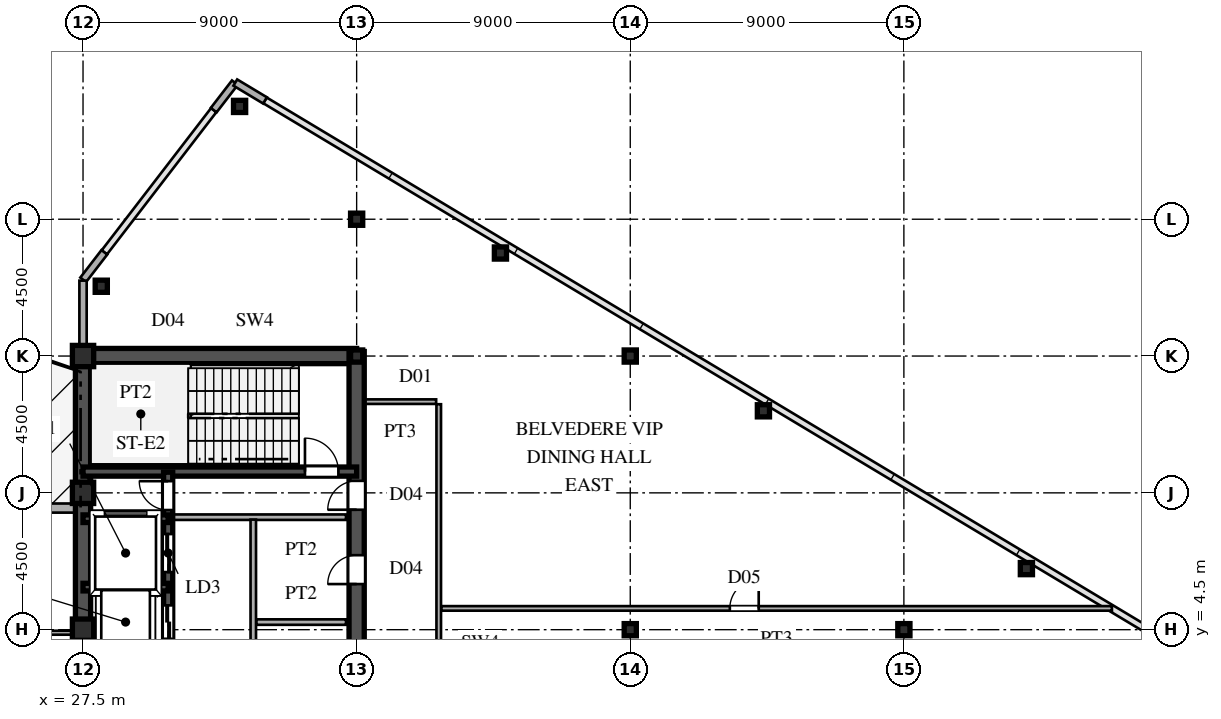
"""IFC4 building model, lengths in metres.
Left out: names, types, materials, properties, quantities, classifications, styles, units other than length and angle.
Written with IfcOpenShell. Run it as: python <this file> out.ifc"""

import sys

from ifc_helpers import new_model, si_unit, direction, frame, frame_2d, origin, origin_2d, place, context, subcontext, project, spatial, rectangle, hollow_rectangle, i_section, extrude, source, transform, mapped, element, fill, save


model = new_model("IFC4")
c1 = context("Model", 3, precision=1e-05, world=origin(), true_north=direction((0.0, 1.0)))
c2 = subcontext(c1, "Body", "Model", "MODEL_VIEW")
j1 = project(units=[si_unit("LENGTHUNIT", "METRE"), si_unit("PLANEANGLEUNIT", "RADIAN")], contexts=[c1])
p1 = place(None, origin())
s1 = spatial("IfcSite", under=j1, at=p1, CompositionType="ELEMENT")
p2 = place(p1, origin())
s2 = spatial("IfcBuilding", under=s1, at=p2, CompositionType="ELEMENT")
p3 = place(p2, frame((0.0, 0.0, 274.2)))
s3 = spatial("IfcBuildingStorey", under=s2, at=p3, CompositionType="ELEMENT", Elevation=274.2)
m1 = source(origin(), c2, "Body", "SweptSolid", [
    extrude(hollow_rectangle(XDim=0.7, YDim=0.7, WallThickness=0.03, at=origin_2d()), origin(), (0.0, 0.0, 1.0), 4.8),
])
for number, where, z_axis, x_axis in (
    (1, (27.5, 4.5, 0.0), (0.0, 0.0, 1.0), (1.0, 0.0, 0.0)),
    (2, (27.5, 9.0, 0.0), (0.0, 0.0, 1.0), (1.0, 0.0, 0.0)),
    (3, (27.5, 13.5, 0.0), (0.0, 0.0, 1.0), (1.0, 0.0, 0.0)),
):
    element("IfcColumn", number, at=place(p3, frame(where, z_axis=z_axis, x_axis=x_axis)), inside=s3, PredefinedType="COLUMN", context=c2, shape_type="MappedRepresentation", body=[
        mapped(m1, transform((0.0, 0.0, 0.0), scale=1.0)),
    ])
m2 = source(origin(), c2, "Body", "SweptSolid", [
    extrude(i_section(OverallWidth=0.4, OverallDepth=0.4, WebThickness=0.013, FlangeThickness=0.021, at=origin_2d()), origin(), (0.0, 0.0, 1.0), 4.8),
])
for number, where, z_axis, x_axis in (
    (4, (36.5, 13.5, 0.0), (0.0, 0.0, 1.0), (1.0, 0.0, 0.0)),
    (5, (36.5, 18.0, 0.0), (0.0, 0.0, 1.0), (1.0, 0.0, 0.0)),
    (6, (45.5, 4.5, 0.0), (0.0, 0.0, 1.0), (1.0, 0.0, 0.0)),
    (7, (45.5, 13.5, 0.0), (0.0, 0.0, 1.0), (1.0, 0.0, 0.0)),
    (8, (54.5, 4.5, 0.0), (0.0, 0.0, 1.0), (1.0, 0.0, 0.0)),
):
    element("IfcColumn", number, at=place(p3, frame(where, z_axis=z_axis, x_axis=x_axis)), inside=s3, PredefinedType="COLUMN", context=c2, shape_type="MappedRepresentation", body=[
        mapped(m2, transform((0.0, 0.0, 0.0), scale=1.0)),
    ])
m3 = source(origin(), c2, "Body", "SweptSolid", [
    extrude(hollow_rectangle(XDim=0.4, YDim=0.4, WallThickness=0.016, at=origin_2d()), origin(), (0.0, 0.0, 1.0), 4.8),
])
for number, where, z_axis, x_axis in (
    (9, (32.65, 21.71, 0.0), (0.0, 0.0, 1.0), (1.0, 0.0, 0.0)),
    (10, (28.1, 15.796, 0.0), (0.0, 0.0, 1.0), (1.0, 0.0, 0.0)),
    (11, (41.23, 16.889, 0.0), (0.0, 0.0, 1.0), (1.0, 0.0, 0.0)),
    (12, (49.88, 11.699, 0.0), (0.0, 0.0, 1.0), (1.0, 0.0, 0.0)),
    (13, (58.53, 6.509, 0.0), (0.0, 0.0, 1.0), (1.0, 0.0, 0.0)),
):
    element("IfcColumn", number, at=place(p3, frame(where, z_axis=z_axis, x_axis=x_axis)), inside=s3, PredefinedType="COLUMN", context=c2, shape_type="MappedRepresentation", body=[
        mapped(m3, transform((0.0, 0.0, 0.0), scale=1.0)),
    ])
for number, where, z_axis, x_axis in (
    (14, (33.486, 21.908, 0.0), (0.0, 0.0, 1.0), (-0.857, 0.515, 0.0)),
    (15, (32.494, 22.492, 0.0), (0.0, 0.0, 1.0), (-0.61, -0.793, 0.0)),
    (16, (28.201, 16.912, 0.0), (0.0, 0.0, 1.0), (-0.61, -0.793, 0.0)),
):
    element("IfcWall", number, at=place(p3, frame(where, z_axis=z_axis, x_axis=x_axis)), inside=s3, PredefinedType="SOLIDWALL", context=c2, shape_type="SweptSolid", body=[
        extrude(rectangle(XDim=1.14, YDim=0.24, at=frame_2d((0.57, 0.0))), origin(), (0.0, 0.0, 1.0), 4.52),
    ])
p4 = place(p3, frame((27.5, 13.755, 0.0), z_axis=(0.0, 0.0, 1.0), x_axis=(0.0, 1.0, 0.0)))
e17 = element("IfcWall", 17, at=p4, inside=s3, PredefinedType="SOLIDWALL", context=c2, shape_type="SweptSolid", body=[
    extrude(rectangle(XDim=0.62, YDim=0.24, at=frame_2d((0.31, 0.0))), origin(), (0.0, 0.0, 1.0), 4.02),
])
p5 = place(p3, frame((27.5, 14.375, 0.0), z_axis=(0.0, 0.0, 1.0), x_axis=(0.0, 1.0, 0.0)))
e18 = element("IfcWall", 18, at=p5, inside=s3, PredefinedType="SOLIDWALL", context=c2, shape_type="SweptSolid", body=[
    extrude(rectangle(XDim=1.605, YDim=0.24, at=frame_2d((0.803, 0.0))), origin(), (0.0, 0.0, 1.0), 4.52),
])
p6 = place(p3, frame((-27.45, 8.5, 0.0), z_axis=(0.0, 0.0, 1.0), x_axis=(1.0, 0.0, 0.0)))
e19 = element("IfcWall", 19, at=p6, inside=s3, PredefinedType="SOLIDWALL", context=c2, shape_type="SweptSolid", body=[
    extrude(rectangle(XDim=54.9, YDim=0.3, at=frame_2d((27.45, 0.0))), origin(), (0.0, 0.0, 1.0), 4.52),
])
p7 = place(p6, frame((12.95, 0.0, 0.0)))
e20 = element("IfcOpeningElement", 20, at=p7, cuts=e19, PredefinedType="OPENING", context=c2, shape_type="SweptSolid", body=[
    extrude(rectangle(XDim=1.9, YDim=2.4, at=frame_2d((0.95, 1.2))), frame((0.0, 0.16, 0.0), z_axis=(0.0, -1.0, 0.0), x_axis=(1.0, 0.0, 0.0)), (0.0, 0.0, 1.0), 0.32),
])
p8 = place(p6, frame((23.95, 0.0, 0.0)))
e21 = element("IfcOpeningElement", 21, at=p8, cuts=e19, PredefinedType="OPENING", context=c2, shape_type="SweptSolid", body=[
    extrude(rectangle(XDim=1.9, YDim=2.4, at=frame_2d((0.95, 1.2))), frame((0.0, 0.16, 0.0), z_axis=(0.0, -1.0, 0.0), x_axis=(1.0, 0.0, 0.0)), (0.0, 0.0, 1.0), 0.32),
])
p9 = place(p6, frame((6.95, 0.0, 0.8)))
e22 = element("IfcOpeningElement", 22, at=p9, cuts=e19, PredefinedType="OPENING", context=c2, shape_type="SweptSolid", body=[
    extrude(rectangle(XDim=2.8, YDim=2.1, at=frame_2d((1.4, 1.05))), frame((0.0, 0.16, 0.0), z_axis=(0.0, -1.0, 0.0), x_axis=(1.0, 0.0, 0.0)), (0.0, 0.0, 1.0), 0.32),
])
p10 = place(p6, frame((17.95, 0.0, 0.8)))
e23 = element("IfcOpeningElement", 23, at=p10, cuts=e19, PredefinedType="OPENING", context=c2, shape_type="SweptSolid", body=[
    extrude(rectangle(XDim=2.8, YDim=2.1, at=frame_2d((1.4, 1.05))), frame((0.0, 0.16, 0.0), z_axis=(0.0, -1.0, 0.0), x_axis=(1.0, 0.0, 0.0)), (0.0, 0.0, 1.0), 0.32),
])
p11 = place(p6, frame((28.95, 0.0, 0.8)))
e24 = element("IfcOpeningElement", 24, at=p11, cuts=e19, PredefinedType="OPENING", context=c2, shape_type="SweptSolid", body=[
    extrude(rectangle(XDim=2.8, YDim=2.1, at=frame_2d((1.4, 1.05))), frame((0.0, 0.16, 0.0), z_axis=(0.0, -1.0, 0.0), x_axis=(1.0, 0.0, 0.0)), (0.0, 0.0, 1.0), 0.32),
])
p12 = place(p3, frame((27.5, 1.3, 0.0), z_axis=(0.0, 0.0, 1.0), x_axis=(0.0, 1.0, 0.0)))
e25 = element("IfcWall", 25, at=p12, inside=s3, PredefinedType="SHEAR", context=c2, shape_type="SweptSolid", body=[
    extrude(rectangle(XDim=12.2, YDim=0.5, at=frame_2d((6.1, 0.0))), origin(), (0.0, 0.0, 1.0), 4.52),
])
p13 = place(p3, frame((27.5, 13.5, 0.0), z_axis=(0.0, 0.0, 1.0), x_axis=(1.0, 0.0, 0.0)))
e26 = element("IfcWall", 26, at=p13, inside=s3, PredefinedType="SHEAR", context=c2, shape_type="SweptSolid", body=[
    extrude(rectangle(XDim=9.0, YDim=0.5, at=frame_2d((4.5, 0.0))), origin(), (0.0, 0.0, 1.0), 4.52),
])
p14 = place(p3, frame((36.5, 8.2, 0.0), z_axis=(0.0, 0.0, 1.0), x_axis=(0.0, 1.0, 0.0)))
e27 = element("IfcWall", 27, at=p14, inside=s3, PredefinedType="SHEAR", context=c2, shape_type="SweptSolid", body=[
    extrude(rectangle(XDim=5.45, YDim=0.5, at=frame_2d((2.725, 0.0))), origin(), (0.0, 0.0, 1.0), 4.52),
])
p15 = place(p14, frame((0.245, 0.0, 0.0)))
e28 = element("IfcOpeningElement", 28, at=p15, cuts=e27, PredefinedType="OPENING", context=c2, shape_type="SweptSolid", body=[
    extrude(rectangle(XDim=0.95, YDim=2.15, at=frame_2d((0.475, 1.075))), frame((0.0, 0.26, 0.0), z_axis=(0.0, -1.0, 0.0), x_axis=(1.0, 0.0, 0.0)), (0.0, 0.0, 1.0), 0.52),
])
p16 = place(p3, frame((36.5, 1.3, 0.0), z_axis=(0.0, 0.0, 1.0), x_axis=(0.0, 1.0, 0.0)))
e29 = element("IfcWall", 29, at=p16, inside=s3, PredefinedType="SHEAR", context=c2, shape_type="SweptSolid", body=[
    extrude(rectangle(XDim=3.45, YDim=0.5, at=frame_2d((1.725, 0.0))), origin(), (0.0, 0.0, 1.0), 4.52),
])
p17 = place(p16, frame((1.25, 0.0, 0.0)))
e30 = element("IfcOpeningElement", 30, at=p17, cuts=e29, PredefinedType="OPENING", context=c2, shape_type="SweptSolid", body=[
    extrude(rectangle(XDim=0.95, YDim=2.15, at=frame_2d((0.475, 1.075))), frame((0.0, 0.26, 0.0), z_axis=(0.0, -1.0, 0.0), x_axis=(1.0, 0.0, 0.0)), (0.0, 0.0, 1.0), 0.52),
])
p18 = place(p3, frame((36.5, 4.75, 0.0), z_axis=(0.0, 0.0, 1.0), x_axis=(0.0, 1.0, 0.0)))
e31 = element("IfcWall", 31, at=p18, inside=s3, PredefinedType="SHEAR", context=c2, shape_type="SweptSolid", body=[
    extrude(rectangle(XDim=3.45, YDim=0.5, at=frame_2d((1.725, 0.0))), origin(), (0.0, 0.0, 1.0), 4.52),
])
p19 = place(p18, frame((1.25, 0.0, 0.0)))
e32 = element("IfcOpeningElement", 32, at=p19, cuts=e31, PredefinedType="OPENING", context=c2, shape_type="SweptSolid", body=[
    extrude(rectangle(XDim=0.95, YDim=2.15, at=frame_2d((0.475, 1.075))), frame((0.0, 0.26, 0.0), z_axis=(0.0, -1.0, 0.0), x_axis=(1.0, 0.0, 0.0)), (0.0, 0.0, 1.0), 0.52),
])
p20 = place(p3, frame((27.5, 9.7, 0.0), z_axis=(0.0, 0.0, 1.0), x_axis=(1.0, 0.0, 0.0)))
e33 = element("IfcWall", 33, at=p20, inside=s3, PredefinedType="SHEAR", context=c2, shape_type="SweptSolid", body=[
    extrude(rectangle(XDim=9.0, YDim=0.3, at=frame_2d((4.5, 0.0))), origin(), (0.0, 0.0, 1.0), 4.52),
])
p21 = place(p20, frame((7.3, 0.0, 0.0)))
e34 = element("IfcOpeningElement", 34, at=p21, cuts=e33, PredefinedType="OPENING", context=c2, shape_type="SweptSolid", body=[
    extrude(rectangle(XDim=1.1, YDim=2.2, at=frame_2d((0.55, 1.1))), frame((0.0, 0.16, 0.0), z_axis=(0.0, -1.0, 0.0), x_axis=(1.0, 0.0, 0.0)), (0.0, 0.0, 1.0), 0.32),
])
for number, where, z_axis, x_axis in (
    (35, (27.5, 5.9, 0.0), (0.0, 0.0, 1.0), (1.0, 0.0, 0.0)),
    (36, (27.5, 8.15, 0.0), (0.0, 0.0, 1.0), (1.0, 0.0, 0.0)),
):
    element("IfcWall", number, at=place(p3, frame(where, z_axis=z_axis, x_axis=x_axis)), inside=s3, PredefinedType="SHEAR", context=c2, shape_type="SweptSolid", body=[
        extrude(rectangle(XDim=2.8, YDim=0.25, at=frame_2d((1.4, 0.0))), origin(), (0.0, 0.0, 1.0), 4.52),
    ])
p22 = place(p3, frame((30.3, 3.6, 0.0), z_axis=(0.0, 0.0, 1.0), x_axis=(0.0, 1.0, 0.0)))
e37 = element("IfcWall", 37, at=p22, inside=s3, PredefinedType="SHEAR", context=c2, shape_type="SweptSolid", body=[
    extrude(rectangle(XDim=2.3, YDim=0.3, at=frame_2d((1.15, 0.0))), origin(), (0.0, 0.0, 1.0), 4.52),
])
p23 = place(p22, frame((0.6, 0.0, 0.0)))
e38 = element("IfcOpeningElement", 38, at=p23, cuts=e37, PredefinedType="OPENING", context=c2, shape_type="SweptSolid", body=[
    extrude(rectangle(XDim=1.1, YDim=2.2, at=frame_2d((0.55, 1.1))), frame((0.0, 0.16, 0.0), z_axis=(0.0, -1.0, 0.0), x_axis=(1.0, 0.0, 0.0)), (0.0, 0.0, 1.0), 0.32),
])
p24 = place(p3, frame((30.3, 5.9, 0.0), z_axis=(0.0, 0.0, 1.0), x_axis=(0.0, 1.0, 0.0)))
e39 = element("IfcWall", 39, at=p24, inside=s3, PredefinedType="SHEAR", context=c2, shape_type="SweptSolid", body=[
    extrude(rectangle(XDim=2.25, YDim=0.3, at=frame_2d((1.125, 0.0))), origin(), (0.0, 0.0, 1.0), 4.52),
])
p25 = place(p24, frame((0.495, 0.0, 0.0)))
e40 = element("IfcOpeningElement", 40, at=p25, cuts=e39, PredefinedType="OPENING", context=c2, shape_type="SweptSolid", body=[
    extrude(rectangle(XDim=1.25, YDim=2.3, at=frame_2d((0.625, 1.15))), frame((0.0, 0.16, 0.0), z_axis=(0.0, -1.0, 0.0), x_axis=(1.0, 0.0, 0.0)), (0.0, 0.0, 1.0), 0.32),
])
p26 = place(p3, frame((30.3, 8.15, 0.0), z_axis=(0.0, 0.0, 1.0), x_axis=(0.0, 1.0, 0.0)))
e41 = element("IfcWall", 41, at=p26, inside=s3, PredefinedType="SHEAR", context=c2, shape_type="SweptSolid", body=[
    extrude(rectangle(XDim=1.53, YDim=0.3, at=frame_2d((0.765, 0.0))), origin(), (0.0, 0.0, 1.0), 4.52),
])
p27 = place(p26, frame((0.285, 0.0, 0.0)))
e42 = element("IfcOpeningElement", 42, at=p27, cuts=e41, PredefinedType="OPENING", context=c2, shape_type="SweptSolid", body=[
    extrude(rectangle(XDim=0.95, YDim=2.15, at=frame_2d((0.475, 1.075))), frame((0.0, 0.16, 0.0), z_axis=(0.0, -1.0, 0.0), x_axis=(1.0, 0.0, 0.0)), (0.0, 0.0, 1.0), 0.32),
])
p28 = place(p3, frame((30.45, 8.2, 0.0), z_axis=(0.0, 0.0, 1.0), x_axis=(1.0, 0.0, 0.0)))
e43 = element("IfcWall", 43, at=p28, inside=s3, PredefinedType="PARTITIONING", context=c2, shape_type="SweptSolid", body=[
    extrude(rectangle(XDim=5.7, YDim=0.18, at=frame_2d((2.85, 0.0))), origin(), (0.0, 0.0, 1.0), 4.52),
])
p29 = place(p3, frame((33.1, 1.38, 0.0), z_axis=(0.0, 0.0, 1.0), x_axis=(0.0, 1.0, 0.0)))
e44 = element("IfcWall", 44, at=p29, inside=s3, PredefinedType="PARTITIONING", context=c2, shape_type="SweptSolid", body=[
    extrude(rectangle(XDim=6.74, YDim=0.18, at=frame_2d((3.37, 0.0))), origin(), (0.0, 0.0, 1.0), 4.52),
])
p30 = place(p3, frame((33.2, 4.75, 0.0), z_axis=(0.0, 0.0, 1.0), x_axis=(1.0, 0.0, 0.0)))
e45 = element("IfcWall", 45, at=p30, inside=s3, PredefinedType="PARTITIONING", context=c2, shape_type="SweptSolid", body=[
    extrude(rectangle(XDim=2.95, YDim=0.18, at=frame_2d((1.475, 0.0))), origin(), (0.0, 0.0, 1.0), 4.52),
])
p31 = place(p3, frame((11.085, 4.4, 0.0), z_axis=(0.0, 0.0, 1.0), x_axis=(1.0, 0.0, 0.0)))
e46 = element("IfcWall", 46, at=p31, inside=s3, PredefinedType="PARTITIONING", context=c2, shape_type="SweptSolid", body=[
    extrude(rectangle(XDim=16.16, YDim=0.13, at=frame_2d((8.08, 0.0))), origin(), (0.0, 0.0, 1.0), 4.52),
])
p32 = place(p3, frame((39.285, 5.2, 0.0), z_axis=(0.0, 0.0, 1.0), x_axis=(1.0, 0.0, 0.0)))
e47 = element("IfcWall", 47, at=p32, inside=s3, PredefinedType="PARTITIONING", context=c2, shape_type="SweptSolid", body=[
    extrude(rectangle(XDim=22.058, YDim=0.15, at=frame_2d((11.029, 0.0))), origin(), (0.0, 0.0, 1.0), 4.52),
])
p33 = place(p32, frame((9.49, 0.0, 0.0)))
e48 = element("IfcOpeningElement", 48, at=p33, cuts=e47, PredefinedType="OPENING", context=c2, shape_type="SweptSolid", body=[
    extrude(rectangle(XDim=0.95, YDim=2.15, at=frame_2d((0.475, 1.075))), frame((0.0, 0.085, 0.0), z_axis=(0.0, -1.0, 0.0), x_axis=(1.0, 0.0, 0.0)), (0.0, 0.0, 1.0), 0.17),
])
p34 = place(p3, frame((36.755, 12.0, 0.0), z_axis=(0.0, 0.0, 1.0), x_axis=(1.0, 0.0, 0.0)))
e49 = element("IfcWall", 49, at=p34, inside=s3, PredefinedType="PARTITIONING", context=c2, shape_type="SweptSolid", body=[
    extrude(rectangle(XDim=2.36, YDim=0.15, at=frame_2d((1.18, 0.0))), origin(), (0.0, 0.0, 1.0), 4.52),
])
p35 = place(p3, frame((39.2, -11.915, 0.0), z_axis=(0.0, 0.0, 1.0), x_axis=(0.0, 1.0, 0.0)))
e50 = element("IfcWall", 50, at=p35, inside=s3, PredefinedType="PARTITIONING", context=c2, shape_type="SweptSolid", body=[
    extrude(rectangle(XDim=23.83, YDim=0.15, at=frame_2d((11.915, 0.0))), origin(), (0.0, 0.0, 1.0), 4.52),
])
p36 = place(p35, frame((11.44, 0.0, 0.0)))
e51 = element("IfcOpeningElement", 51, at=p36, cuts=e50, PredefinedType="OPENING", context=c2, shape_type="SweptSolid", body=[
    extrude(rectangle(XDim=0.95, YDim=2.15, at=frame_2d((0.475, 1.075))), frame((0.0, 0.085, 0.0), z_axis=(0.0, -1.0, 0.0), x_axis=(1.0, 0.0, 0.0)), (0.0, 0.0, 1.0), 0.17),
])
m4 = source(origin(), c2, "Body", "SweptSolid", [
    extrude(rectangle(XDim=0.95, YDim=2.15, at=frame_2d((0.475, 1.075))), frame((0.0, 0.025, 0.0), z_axis=(0.0, -1.0, 0.0), x_axis=(1.0, 0.0, 0.0)), (0.0, 0.0, 1.0), 0.05),
])
p37 = place(p15, origin())
e52 = element("IfcDoor", 52, at=p37, inside=s3, OperationType="SINGLE_SWING_LEFT", PredefinedType="DOOR", context=c2, shape_type="MappedRepresentation", body=[
    mapped(m4, transform((0.0, 0.0, 0.0), scale=1.0)),
])
fill(e28, e52)
p38 = place(p19, origin())
e53 = element("IfcDoor", 53, at=p38, inside=s3, OperationType="SINGLE_SWING_LEFT", PredefinedType="DOOR", context=c2, shape_type="MappedRepresentation", body=[
    mapped(m4, transform((0.0, 0.0, 0.0), scale=1.0)),
])
fill(e32, e53)
m5 = source(origin(), c2, "Body", "SweptSolid", [
    extrude(rectangle(XDim=1.1, YDim=2.2, at=frame_2d((0.55, 1.1))), frame((0.0, 0.025, 0.0), z_axis=(0.0, -1.0, 0.0), x_axis=(1.0, 0.0, 0.0)), (0.0, 0.0, 1.0), 0.05),
])
p39 = place(p21, origin())
e54 = element("IfcDoor", 54, at=p39, inside=s3, OperationType="SINGLE_SWING_LEFT", PredefinedType="DOOR", context=c2, shape_type="MappedRepresentation", body=[
    mapped(m5, transform((0.0, 0.0, 0.0), scale=1.0)),
])
fill(e34, e54)
m6 = source(origin(), c2, "Body", "SweptSolid", [
    extrude(rectangle(XDim=1.1, YDim=2.2, at=frame_2d((0.55, 1.1))), frame((0.0, 0.025, 0.0), z_axis=(0.0, -1.0, 0.0), x_axis=(1.0, 0.0, 0.0)), (0.0, 0.0, 1.0), 0.05),
])
p40 = place(p23, origin())
e55 = element("IfcDoor", 55, at=p40, inside=s3, OperationType="DOUBLE_DOOR_SLIDING", PredefinedType="DOOR", context=c2, shape_type="MappedRepresentation", body=[
    mapped(m6, transform((0.0, 0.0, 0.0), scale=1.0)),
])
fill(e38, e55)
m7 = source(origin(), c2, "Body", "SweptSolid", [
    extrude(rectangle(XDim=1.25, YDim=2.3, at=frame_2d((0.625, 1.15))), frame((0.0, 0.025, 0.0), z_axis=(0.0, -1.0, 0.0), x_axis=(1.0, 0.0, 0.0)), (0.0, 0.0, 1.0), 0.05),
])
p41 = place(p25, origin())
e56 = element("IfcDoor", 56, at=p41, inside=s3, OperationType="DOUBLE_DOOR_SLIDING", PredefinedType="DOOR", context=c2, shape_type="MappedRepresentation", body=[
    mapped(m7, transform((0.0, 0.0, 0.0), scale=1.0)),
])
fill(e40, e56)
p42 = place(p27, origin())
e57 = element("IfcDoor", 57, at=p42, inside=s3, OperationType="SINGLE_SWING_RIGHT", PredefinedType="DOOR", context=c2, shape_type="MappedRepresentation", body=[
    mapped(m4, transform((0.0, 0.0, 0.0), scale=1.0)),
])
fill(e42, e57)
m8 = source(origin(), c2, "Body", "SweptSolid", [
    extrude(rectangle(XDim=0.95, YDim=2.15, at=frame_2d((0.475, 1.075))), frame((0.0, 0.025, 0.0), z_axis=(0.0, -1.0, 0.0), x_axis=(1.0, 0.0, 0.0)), (0.0, 0.0, 1.0), 0.05),
])
p43 = place(p33, origin())
e58 = element("IfcDoor", 58, at=p43, inside=s3, OperationType="SINGLE_SWING_RIGHT", PredefinedType="DOOR", context=c2, shape_type="MappedRepresentation", body=[
    mapped(m8, transform((0.0, 0.0, 0.0), scale=1.0)),
])
fill(e48, e58)
save(model, sys.argv[1])
